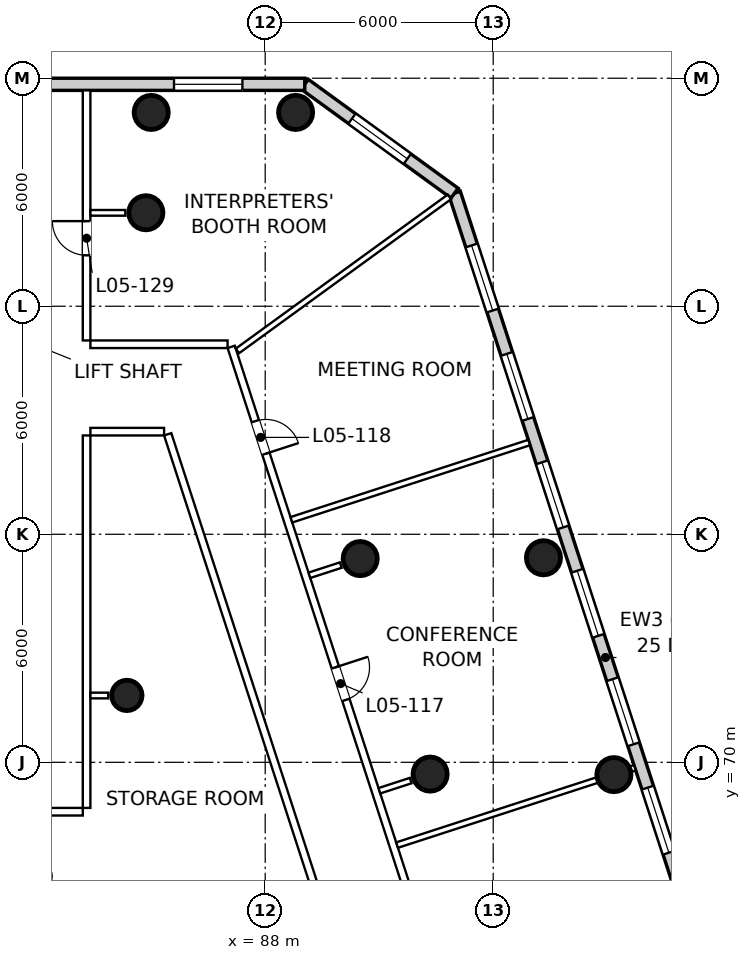
"""IFC4 building model, lengths in metres.
Left out: names, types, materials, properties, quantities, classifications, styles, units other than length and angle.
Written with IfcOpenShell. Run it as: python <this file> out.ifc"""

import sys

from ifc_helpers import new_model, si_unit, direction, frame, frame_2d, origin, origin_2d, place, context, subcontext, project, spatial, rectangle, circle, extrude, element, fill, save


model = new_model("IFC4")
c1 = context("Model", 3, precision=1e-05, world=origin(), true_north=direction((0.0, 1.0)))
c2 = subcontext(c1, "Body", "Model", "MODEL_VIEW")
j1 = project(units=[si_unit("LENGTHUNIT", "METRE"), si_unit("PLANEANGLEUNIT", "RADIAN")], contexts=[c1])
p1 = place(None, origin())
s1 = spatial("IfcSite", under=j1, at=p1, CompositionType="ELEMENT")
p2 = place(p1, origin())
s2 = spatial("IfcBuilding", under=s1, at=p2, CompositionType="ELEMENT")
p3 = place(p2, frame((0.0, 0.0, 34.0)))
s3 = spatial("IfcBuildingStorey", under=s2, at=p3, CompositionType="ELEMENT", Elevation=34.0)
for number, where, z_axis, x_axis in (
    (1, (92.34, 69.69, 0.0), (0.0, 0.0, 1.0), (1.0, 0.0, 0.0)),
    (2, (90.5, 75.36, 0.0), (0.0, 0.0, 1.0), (1.0, 0.0, 0.0)),
    (3, (84.86, 84.46, 0.0), (0.0, 0.0, 1.0), (1.0, 0.0, 0.0)),
):
    element("IfcColumn", number, at=place(p3, frame(where, z_axis=z_axis, x_axis=x_axis)), inside=s3, PredefinedType="COLUMN", context=c2, shape_type="SweptSolid", body=[
        extrude(circle(Radius=0.45, at=origin_2d()), origin(), (0.0, 0.0, 1.0), 5.0),
    ])
p4 = place(p3, frame((84.36, 71.76, 0.0), z_axis=(0.0, 0.0, 1.0), x_axis=(1.0, 0.0, 0.0)))
e4 = element("IfcColumn", 4, at=p4, inside=s3, PredefinedType="COLUMN", context=c2, shape_type="SweptSolid", body=[
    extrude(circle(Radius=0.4, at=origin_2d()), origin(), (0.0, 0.0, 1.0), 5.0),
])
for number, where, z_axis, x_axis in (
    (5, (97.176, 69.676, 0.0), (0.0, 0.0, 1.0), (1.0, 0.0, 0.0)),
    (6, (95.322, 75.382, 0.0), (0.0, 0.0, 1.0), (1.0, 0.0, 0.0)),
    (7, (88.8, 87.1, 0.0), (0.0, 0.0, 1.0), (1.0, 0.0, 0.0)),
    (8, (85.0, 87.1, 0.0), (0.0, 0.0, 1.0), (1.0, 0.0, 0.0)),
):
    element("IfcColumn", number, at=place(p3, frame(where, z_axis=z_axis, x_axis=x_axis)), inside=s3, PredefinedType="COLUMN", context=c2, shape_type="SweptSolid", body=[
        extrude(circle(Radius=0.45, at=origin_2d()), origin(), (0.0, 0.0, 1.0), 5.0),
    ])
p5 = place(p3, frame((100.923, 60.539, 0.0), z_axis=(0.0, 0.0, 1.0), x_axis=(-0.309015385889, 0.951057038922, 0.0)))
e9 = element("IfcWall", 9, at=p5, inside=s3, PredefinedType="SOLIDWALL", context=c2, shape_type="SweptSolid", body=[
    extrude(rectangle(XDim=25.694, YDim=0.32, at=frame_2d((12.847, 0.0))), origin(), (0.0, 0.0, 1.0), 4.6),
])
p6 = place(p5, frame((1.447, 0.0, 0.9)))
e10 = element("IfcOpeningElement", 10, at=p6, cuts=e9, PredefinedType="OPENING", context=c2, shape_type="SweptSolid", body=[
    extrude(rectangle(XDim=1.8, YDim=2.1, at=frame_2d((0.9, 1.05))), frame((0.0, 0.17, 0.0), z_axis=(0.0, -1.0, 0.0), x_axis=(1.0, 0.0, 0.0)), (0.0, 0.0, 1.0), 0.34),
])
p7 = place(p5, frame((4.447, 0.0, 0.9)))
e11 = element("IfcOpeningElement", 11, at=p7, cuts=e9, PredefinedType="OPENING", context=c2, shape_type="SweptSolid", body=[
    extrude(rectangle(XDim=1.8, YDim=2.1, at=frame_2d((0.9, 1.05))), frame((0.0, 0.17, 0.0), z_axis=(0.0, -1.0, 0.0), x_axis=(1.0, 0.0, 0.0)), (0.0, 0.0, 1.0), 0.34),
])
p8 = place(p5, frame((7.447, 0.0, 0.9)))
e12 = element("IfcOpeningElement", 12, at=p8, cuts=e9, PredefinedType="OPENING", context=c2, shape_type="SweptSolid", body=[
    extrude(rectangle(XDim=1.8, YDim=2.1, at=frame_2d((0.9, 1.05))), frame((0.0, 0.17, 0.0), z_axis=(0.0, -1.0, 0.0), x_axis=(1.0, 0.0, 0.0)), (0.0, 0.0, 1.0), 0.34),
])
p9 = place(p5, frame((10.447, 0.0, 0.9)))
e13 = element("IfcOpeningElement", 13, at=p9, cuts=e9, PredefinedType="OPENING", context=c2, shape_type="SweptSolid", body=[
    extrude(rectangle(XDim=1.8, YDim=2.1, at=frame_2d((0.9, 1.05))), frame((0.0, 0.17, 0.0), z_axis=(0.0, -1.0, 0.0), x_axis=(1.0, 0.0, 0.0)), (0.0, 0.0, 1.0), 0.34),
])
p10 = place(p5, frame((13.447, 0.0, 0.9)))
e14 = element("IfcOpeningElement", 14, at=p10, cuts=e9, PredefinedType="OPENING", context=c2, shape_type="SweptSolid", body=[
    extrude(rectangle(XDim=1.8, YDim=2.1, at=frame_2d((0.9, 1.05))), frame((0.0, 0.17, 0.0), z_axis=(0.0, -1.0, 0.0), x_axis=(1.0, 0.0, 0.0)), (0.0, 0.0, 1.0), 0.34),
])
p11 = place(p5, frame((16.447, 0.0, 0.9)))
e15 = element("IfcOpeningElement", 15, at=p11, cuts=e9, PredefinedType="OPENING", context=c2, shape_type="SweptSolid", body=[
    extrude(rectangle(XDim=1.8, YDim=2.1, at=frame_2d((0.9, 1.05))), frame((0.0, 0.17, 0.0), z_axis=(0.0, -1.0, 0.0), x_axis=(1.0, 0.0, 0.0)), (0.0, 0.0, 1.0), 0.34),
])
p12 = place(p5, frame((19.447, 0.0, 0.9)))
e16 = element("IfcOpeningElement", 16, at=p12, cuts=e9, PredefinedType="OPENING", context=c2, shape_type="SweptSolid", body=[
    extrude(rectangle(XDim=1.8, YDim=2.1, at=frame_2d((0.9, 1.05))), frame((0.0, 0.17, 0.0), z_axis=(0.0, -1.0, 0.0), x_axis=(1.0, 0.0, 0.0)), (0.0, 0.0, 1.0), 0.34),
])
p13 = place(p5, frame((22.447, 0.0, 0.9)))
e17 = element("IfcOpeningElement", 17, at=p13, cuts=e9, PredefinedType="OPENING", context=c2, shape_type="SweptSolid", body=[
    extrude(rectangle(XDim=1.8, YDim=2.1, at=frame_2d((0.9, 1.05))), frame((0.0, 0.17, 0.0), z_axis=(0.0, -1.0, 0.0), x_axis=(1.0, 0.0, 0.0)), (0.0, 0.0, 1.0), 0.34),
])
p14 = place(p3, frame((92.983, 84.976, 0.0), z_axis=(0.0, 0.0, 1.0), x_axis=(-0.809004657531, 0.587802232127, 0.0)))
e18 = element("IfcWall", 18, at=p14, inside=s3, PredefinedType="SOLIDWALL", context=c2, shape_type="SweptSolid", body=[
    extrude(rectangle(XDim=4.873, YDim=0.32, at=frame_2d((2.437, 0.0))), origin(), (0.0, 0.0, 1.0), 4.6),
])
p15 = place(p14, frame((1.536, 0.0, 0.9)))
e19 = element("IfcOpeningElement", 19, at=p15, cuts=e18, PredefinedType="OPENING", context=c2, shape_type="SweptSolid", body=[
    extrude(rectangle(XDim=1.8, YDim=2.1, at=frame_2d((0.9, 1.05))), frame((0.0, 0.17, 0.0), z_axis=(0.0, -1.0, 0.0), x_axis=(1.0, 0.0, 0.0)), (0.0, 0.0, 1.0), 0.34),
])
p16 = place(p3, frame((89.041, 87.84, 0.0), z_axis=(0.0, 0.0, 1.0), x_axis=(-1.0, 0.0, 0.0)))
e20 = element("IfcWall", 20, at=p16, inside=s3, PredefinedType="SOLIDWALL", context=c2, shape_type="SweptSolid", body=[
    extrude(rectangle(XDim=8.041, YDim=0.32, at=frame_2d((4.021, 0.0))), origin(), (0.0, 0.0, 1.0), 4.6),
])
p17 = place(p16, frame((1.641, 0.0, 0.9)))
e21 = element("IfcOpeningElement", 21, at=p17, cuts=e20, PredefinedType="OPENING", context=c2, shape_type="SweptSolid", body=[
    extrude(rectangle(XDim=1.8, YDim=2.1, at=frame_2d((0.9, 1.05))), frame((0.0, 0.17, 0.0), z_axis=(0.0, -1.0, 0.0), x_axis=(1.0, 0.0, 0.0)), (0.0, 0.0, 1.0), 0.34),
])
p18 = place(p3, frame((83.3, 87.68, 0.0), z_axis=(0.0, 0.0, 1.0), x_axis=(0.0, -1.0, 0.0)))
e22 = element("IfcWall", 22, at=p18, inside=s3, PredefinedType="PARTITIONING", context=c2, shape_type="SweptSolid", body=[
    extrude(rectangle(XDim=6.58, YDim=0.2, at=frame_2d((3.29, 0.0))), origin(), (0.0, 0.0, 1.0), 3.9),
])
p19 = place(p18, frame((3.44, 0.0, 0.0)))
e23 = element("IfcOpeningElement", 23, at=p19, cuts=e22, PredefinedType="OPENING", context=c2, shape_type="SweptSolid", body=[
    extrude(rectangle(XDim=0.9, YDim=2.1, at=frame_2d((0.45, 1.05))), frame((0.0, 0.11, 0.0), z_axis=(0.0, -1.0, 0.0), x_axis=(1.0, 0.0, 0.0)), (0.0, 0.0, 1.0), 0.22),
])
p20 = place(p3, frame((83.4, 81.0, 0.0), z_axis=(0.0, 0.0, 1.0), x_axis=(1.0, 0.0, 0.0)))
e24 = element("IfcWall", 24, at=p20, inside=s3, PredefinedType="PARTITIONING", context=c2, shape_type="SweptSolid", body=[
    extrude(rectangle(XDim=3.61, YDim=0.2, at=frame_2d((1.805, 0.0))), origin(), (0.0, 0.0, 1.0), 3.9),
])
p21 = place(p3, frame((87.105, 80.931, 0.0), z_axis=(0.0, 0.0, 1.0), x_axis=(0.309020575415, -0.951055352737, 0.0)))
e25 = element("IfcWall", 25, at=p21, inside=s3, PredefinedType="PARTITIONING", context=c2, shape_type="SweptSolid", body=[
    extrude(rectangle(XDim=21.409, YDim=0.2, at=frame_2d((10.704, 0.0))), origin(), (0.0, 0.0, 1.0), 3.9),
])
p22 = place(p21, frame((17.129, 0.0, 0.0)))
e26 = element("IfcOpeningElement", 26, at=p22, cuts=e25, PredefinedType="OPENING", context=c2, shape_type="SweptSolid", body=[
    extrude(rectangle(XDim=0.9, YDim=2.1, at=frame_2d((0.45, 1.05))), frame((0.0, 0.11, 0.0), z_axis=(0.0, -1.0, 0.0), x_axis=(1.0, 0.0, 0.0)), (0.0, 0.0, 1.0), 0.22),
])
p23 = place(p21, frame((8.866, 0.0, 0.0)))
e27 = element("IfcOpeningElement", 27, at=p23, cuts=e25, PredefinedType="OPENING", context=c2, shape_type="SweptSolid", body=[
    extrude(rectangle(XDim=0.9, YDim=2.1, at=frame_2d((0.45, 1.05))), frame((0.0, 0.11, 0.0), z_axis=(0.0, -1.0, 0.0), x_axis=(1.0, 0.0, 0.0)), (0.0, 0.0, 1.0), 0.22),
])
p24 = place(p21, frame((2.054, 0.0, 0.0)))
e28 = element("IfcOpeningElement", 28, at=p24, cuts=e25, PredefinedType="OPENING", context=c2, shape_type="SweptSolid", body=[
    extrude(rectangle(XDim=0.9, YDim=2.1, at=frame_2d((0.45, 1.05))), frame((0.0, 0.11, 0.0), z_axis=(0.0, -1.0, 0.0), x_axis=(1.0, 0.0, 0.0)), (0.0, 0.0, 1.0), 0.22),
])
p25 = place(p3, frame((91.302, 60.57, 0.0), z_axis=(0.0, 0.0, 1.0), x_axis=(-0.309021827521, 0.951054945897, 0.0)))
e29 = element("IfcWall", 29, at=p25, inside=s3, PredefinedType="PARTITIONING", context=c2, shape_type="SweptSolid", body=[
    extrude(rectangle(XDim=18.99, YDim=0.2, at=frame_2d((9.495, 0.0))), origin(), (0.0, 0.0, 1.0), 4.6),
])
p26 = place(p3, frame((85.339, 78.7, 0.0), z_axis=(0.0, 0.0, 1.0), x_axis=(-1.0, 0.0, 0.0)))
e30 = element("IfcWall", 30, at=p26, inside=s3, PredefinedType="PARTITIONING", context=c2, shape_type="SweptSolid", body=[
    extrude(rectangle(XDim=1.939, YDim=0.2, at=frame_2d((0.97, 0.0))), origin(), (0.0, 0.0, 1.0), 4.6),
])
p27 = place(p3, frame((83.3, 78.6, 0.0), z_axis=(0.0, 0.0, 1.0), x_axis=(0.0, -1.0, 0.0)))
e31 = element("IfcWall", 31, at=p27, inside=s3, PredefinedType="PARTITIONING", context=c2, shape_type="SweptSolid", body=[
    extrude(rectangle(XDim=9.8, YDim=0.2, at=frame_2d((4.9, 0.0))), origin(), (0.0, 0.0, 1.0), 4.0),
])
p28 = place(p3, frame((83.2, 68.7, 0.0), z_axis=(0.0, 0.0, 1.0), x_axis=(-1.0, 0.0, 0.0)))
e32 = element("IfcWall", 32, at=p28, inside=s3, PredefinedType="PARTITIONING", context=c2, shape_type="SweptSolid", body=[
    extrude(rectangle(XDim=11.95, YDim=0.2, at=frame_2d((5.975, 0.0))), origin(), (0.0, 0.0, 1.0), 4.6),
])
p29 = place(p3, frame((92.847, 84.877, 0.0), z_axis=(0.0, 0.0, 1.0), x_axis=(-0.809014705012, -0.587788403317, 0.0)))
e33 = element("IfcWall", 33, at=p29, inside=s3, PredefinedType="PARTITIONING", context=c2, shape_type="SweptSolid", body=[
    extrude(rectangle(XDim=6.894, YDim=0.15, at=frame_2d((3.447, 0.0))), origin(), (0.0, 0.0, 1.0), 4.6),
])
p30 = place(p3, frame((97.728, 69.855, 0.0), z_axis=(0.0, 0.0, 1.0), x_axis=(-0.951049337045, -0.309039088961, 0.0)))
e34 = element("IfcWall", 34, at=p30, inside=s3, PredefinedType="PARTITIONING", context=c2, shape_type="SweptSolid", body=[
    extrude(rectangle(XDim=6.58, YDim=0.15, at=frame_2d((3.29, 0.0))), origin(), (0.0, 0.0, 1.0), 4.1),
])
p31 = place(p3, frame((94.947, 78.414, 0.0), z_axis=(0.0, 0.0, 1.0), x_axis=(-0.951063784568, -0.308994624035, 0.0)))
e35 = element("IfcWall", 35, at=p31, inside=s3, PredefinedType="PARTITIONING", context=c2, shape_type="SweptSolid", body=[
    extrude(rectangle(XDim=6.58, YDim=0.15, at=frame_2d((3.29, 0.0))), origin(), (0.0, 0.0, 1.0), 3.9),
])
p32 = place(p3, frame((91.828, 69.519, 0.0), z_axis=(0.0, 0.0, 1.0), x_axis=(-0.95113772004, -0.308766963123, 0.0)))
e36 = element("IfcWall", 36, at=p32, inside=s3, PredefinedType="PARTITIONING", context=c2, shape_type="SweptSolid", body=[
    extrude(rectangle(XDim=0.865, YDim=0.15, at=frame_2d((0.433, 0.0))), origin(), (0.0, 0.0, 1.0), 4.6),
])
p33 = place(p3, frame((89.988, 75.189, 0.0), z_axis=(0.0, 0.0, 1.0), x_axis=(-0.95102165437, -0.309124267762, 0.0)))
e37 = element("IfcWall", 37, at=p33, inside=s3, PredefinedType="PARTITIONING", context=c2, shape_type="SweptSolid", body=[
    extrude(rectangle(XDim=0.867, YDim=0.15, at=frame_2d((0.434, 0.0))), origin(), (0.0, 0.0, 1.0), 4.6),
])
p34 = place(p3, frame((84.32, 84.458, 0.0), z_axis=(0.0, 0.0, 1.0), x_axis=(-1.0, 0.0, 0.0)))
e38 = element("IfcWall", 38, at=p34, inside=s3, PredefinedType="PARTITIONING", context=c2, shape_type="SweptSolid", body=[
    extrude(rectangle(XDim=0.92, YDim=0.15, at=frame_2d((0.46, 0.0))), origin(), (0.0, 0.0, 1.0), 4.1),
])
p35 = place(p3, frame((83.87, 71.758, 0.0), z_axis=(0.0, 0.0, 1.0), x_axis=(-1.0, 0.0, 0.0)))
e39 = element("IfcWall", 39, at=p35, inside=s3, PredefinedType="PARTITIONING", context=c2, shape_type="SweptSolid", body=[
    extrude(rectangle(XDim=0.47, YDim=0.15, at=frame_2d((0.235, 0.0))), origin(), (0.0, 0.0, 1.0), 4.0),
])
p36 = place(p8, origin())
e40 = element("IfcWindow", 40, at=p36, inside=s3, PartitioningType="SINGLE_PANEL", PredefinedType="WINDOW", context=c2, shape_type="SweptSolid", body=[
    extrude(rectangle(XDim=1.8, YDim=2.1, at=frame_2d((0.9, 1.05))), frame((0.0, 0.07, 0.0), z_axis=(0.0, -1.0, 0.0), x_axis=(1.0, 0.0, 0.0)), (0.0, 0.0, 1.0), 0.06),
])
fill(e12, e40)
p37 = place(p9, origin())
e41 = element("IfcWindow", 41, at=p37, inside=s3, PartitioningType="SINGLE_PANEL", PredefinedType="WINDOW", context=c2, shape_type="SweptSolid", body=[
    extrude(rectangle(XDim=1.8, YDim=2.1, at=frame_2d((0.9, 1.05))), frame((0.0, 0.07, 0.0), z_axis=(0.0, -1.0, 0.0), x_axis=(1.0, 0.0, 0.0)), (0.0, 0.0, 1.0), 0.06),
])
fill(e13, e41)
p38 = place(p10, origin())
e42 = element("IfcWindow", 42, at=p38, inside=s3, PartitioningType="SINGLE_PANEL", PredefinedType="WINDOW", context=c2, shape_type="SweptSolid", body=[
    extrude(rectangle(XDim=1.8, YDim=2.1, at=frame_2d((0.9, 1.05))), frame((0.0, 0.07, 0.0), z_axis=(0.0, -1.0, 0.0), x_axis=(1.0, 0.0, 0.0)), (0.0, 0.0, 1.0), 0.06),
])
fill(e14, e42)
p39 = place(p11, origin())
e43 = element("IfcWindow", 43, at=p39, inside=s3, PartitioningType="SINGLE_PANEL", PredefinedType="WINDOW", context=c2, shape_type="SweptSolid", body=[
    extrude(rectangle(XDim=1.8, YDim=2.1, at=frame_2d((0.9, 1.05))), frame((0.0, 0.07, 0.0), z_axis=(0.0, -1.0, 0.0), x_axis=(1.0, 0.0, 0.0)), (0.0, 0.0, 1.0), 0.06),
])
fill(e15, e43)
p40 = place(p12, origin())
e44 = element("IfcWindow", 44, at=p40, inside=s3, PartitioningType="SINGLE_PANEL", PredefinedType="WINDOW", context=c2, shape_type="SweptSolid", body=[
    extrude(rectangle(XDim=1.8, YDim=2.1, at=frame_2d((0.9, 1.05))), frame((0.0, 0.07, 0.0), z_axis=(0.0, -1.0, 0.0), x_axis=(1.0, 0.0, 0.0)), (0.0, 0.0, 1.0), 0.06),
])
fill(e16, e44)
p41 = place(p13, origin())
e45 = element("IfcWindow", 45, at=p41, inside=s3, PartitioningType="SINGLE_PANEL", PredefinedType="WINDOW", context=c2, shape_type="SweptSolid", body=[
    extrude(rectangle(XDim=1.8, YDim=2.1, at=frame_2d((0.9, 1.05))), frame((0.0, 0.07, 0.0), z_axis=(0.0, -1.0, 0.0), x_axis=(1.0, 0.0, 0.0)), (0.0, 0.0, 1.0), 0.06),
])
fill(e17, e45)
p42 = place(p15, origin())
e46 = element("IfcWindow", 46, at=p42, inside=s3, PartitioningType="SINGLE_PANEL", PredefinedType="WINDOW", context=c2, shape_type="SweptSolid", body=[
    extrude(rectangle(XDim=1.8, YDim=2.1, at=frame_2d((0.9, 1.05))), frame((0.0, 0.07, 0.0), z_axis=(0.0, -1.0, 0.0), x_axis=(1.0, 0.0, 0.0)), (0.0, 0.0, 1.0), 0.06),
])
fill(e19, e46)
p43 = place(p17, origin())
e47 = element("IfcWindow", 47, at=p43, inside=s3, PartitioningType="SINGLE_PANEL", PredefinedType="WINDOW", context=c2, shape_type="SweptSolid", body=[
    extrude(rectangle(XDim=1.8, YDim=2.1, at=frame_2d((0.9, 1.05))), frame((0.0, 0.07, 0.0), z_axis=(0.0, -1.0, 0.0), x_axis=(1.0, 0.0, 0.0)), (0.0, 0.0, 1.0), 0.06),
])
fill(e21, e47)
p44 = place(p23, origin())
e48 = element("IfcDoor", 48, at=p44, inside=s3, OperationType="SINGLE_SWING_LEFT", PredefinedType="DOOR", context=c2, shape_type="SweptSolid", body=[
    extrude(rectangle(XDim=0.9, YDim=2.1, at=frame_2d((0.45, 1.05))), frame((0.0, 0.025, 0.0), z_axis=(0.0, -1.0, 0.0), x_axis=(1.0, 0.0, 0.0)), (0.0, 0.0, 1.0), 0.05),
])
fill(e27, e48)
p45 = place(p24, origin())
e49 = element("IfcDoor", 49, at=p45, inside=s3, OperationType="SINGLE_SWING_RIGHT", PredefinedType="DOOR", context=c2, shape_type="SweptSolid", body=[
    extrude(rectangle(XDim=0.9, YDim=2.1, at=frame_2d((0.45, 1.05))), frame((0.0, 0.025, 0.0), z_axis=(0.0, -1.0, 0.0), x_axis=(1.0, 0.0, 0.0)), (0.0, 0.0, 1.0), 0.05),
])
fill(e28, e49)
p46 = place(p19, frame((0.9, 0.0, 0.0), z_axis=(0.0, 0.0, 1.0), x_axis=(-1.0, 0.0, 0.0)))
e50 = element("IfcDoor", 50, at=p46, inside=s3, OperationType="SINGLE_SWING_RIGHT", PredefinedType="DOOR", context=c2, shape_type="SweptSolid", body=[
    extrude(rectangle(XDim=0.9, YDim=2.1, at=frame_2d((0.45, 1.05))), frame((0.0, 0.025, 0.0), z_axis=(0.0, -1.0, 0.0), x_axis=(1.0, 0.0, 0.0)), (0.0, 0.0, 1.0), 0.05),
])
fill(e23, e50)
save(model, sys.argv[1])
